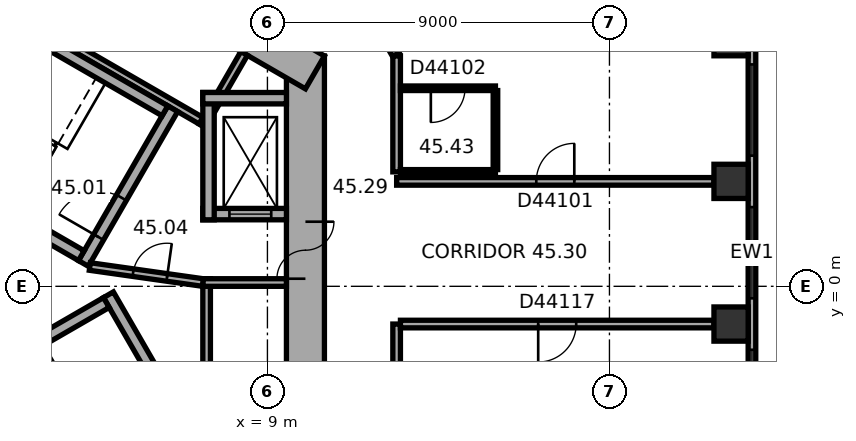
"""IFC4 building model, lengths in metres.
Left out: names, types, materials, properties, quantities, classifications, styles, units other than length and angle.
Written with IfcOpenShell. Run it as: python <this file> out.ifc"""

import sys

from ifc_helpers import new_model, si_unit, direction, frame, frame_2d, origin, origin_2d, place, context, subcontext, project, spatial, rectangle, extrude, element, fill, save


model = new_model("IFC4")
c1 = context("Model", 3, precision=1e-05, world=origin(), true_north=direction((0.0, 1.0)))
c2 = subcontext(c1, "Body", "Model", "MODEL_VIEW")
j1 = project(units=[si_unit("LENGTHUNIT", "METRE"), si_unit("PLANEANGLEUNIT", "RADIAN")], contexts=[c1])
p1 = place(None, origin())
s1 = spatial("IfcSite", under=j1, at=p1, CompositionType="ELEMENT")
p2 = place(p1, origin())
s2 = spatial("IfcBuilding", under=s1, at=p2, CompositionType="ELEMENT")
p3 = place(p2, frame((0.0, 0.0, 183.6)))
s3 = spatial("IfcBuildingStorey", under=s2, at=p3, CompositionType="ELEMENT", Elevation=183.6)
for number, where, z_axis, x_axis in (
    (1, (21.2, -0.993, 0.0), (0.0, 0.0, 1.0), (0.0, 1.0, 0.0)),
    (2, (21.2, 2.761, 0.0), (0.0, 0.0, 1.0), (0.0, 1.0, 0.0)),
    (3, (21.2, 6.515, 0.0), (0.0, 0.0, 1.0), (0.0, 1.0, 0.0)),
):
    element("IfcColumn", number, at=place(p3, frame(where, z_axis=z_axis, x_axis=x_axis)), inside=s3, PredefinedType="COLUMN", context=c2, shape_type="SweptSolid", body=[
        extrude(rectangle(XDim=0.9, YDim=0.9, at=origin_2d()), origin(), (0.0, 0.0, 1.0), 3.7),
    ])
p4 = place(p3, frame((10.0, -6.062, 0.0), z_axis=(0.0, 0.0, 1.0), x_axis=(0.0, 1.0, 0.0)))
e4 = element("IfcWall", 4, at=p4, inside=s3, PredefinedType="SHEAR", context=c2, shape_type="SweptSolid", body=[
    extrude(rectangle(XDim=12.125, YDim=1.0, at=frame_2d((6.062, 0.0))), origin(), (0.0, 0.0, 1.0), 3.7),
])
p5 = place(p4, frame((6.262, 0.0, 0.0)))
e5 = element("IfcOpeningElement", 5, at=p5, cuts=e4, PredefinedType="OPENING", context=c2, shape_type="SweptSolid", body=[
    extrude(rectangle(XDim=1.5, YDim=2.1, at=frame_2d((0.75, 1.05))), frame((0.0, 0.51, 0.0), z_axis=(0.0, -1.0, 0.0), x_axis=(1.0, 0.0, 0.0)), (0.0, 0.0, 1.0), 1.02),
])
p6 = place(p4, frame((3.112, 0.0, 0.0)))
e6 = element("IfcOpeningElement", 6, at=p6, cuts=e4, PredefinedType="OPENING", context=c2, shape_type="SweptSolid", body=[
    extrude(rectangle(XDim=0.9, YDim=2.1, at=frame_2d((0.45, 1.05))), frame((0.0, 0.51, 0.0), z_axis=(0.0, -1.0, 0.0), x_axis=(1.0, 0.0, 0.0)), (0.0, 0.0, 1.0), 1.02),
])
p7 = place(p3, frame((10.25, 5.629, 0.0), z_axis=(0.0, 0.0, 1.0), x_axis=(-0.866022616891, 0.50000482701, 0.0)))
e7 = element("IfcWall", 7, at=p7, inside=s3, PredefinedType="SHEAR", context=c2, shape_type="SweptSolid", body=[
    extrude(rectangle(XDim=12.125, YDim=1.0, at=frame_2d((6.062, 0.0))), origin(), (0.0, 0.0, 1.0), 3.7),
])
p8 = place(p7, frame((5.312, 0.0, 0.0)))
e8 = element("IfcOpeningElement", 8, at=p8, cuts=e7, PredefinedType="OPENING", context=c2, shape_type="SweptSolid", body=[
    extrude(rectangle(XDim=0.9, YDim=2.1, at=frame_2d((0.45, 1.05))), frame((0.0, 0.51, 0.0), z_axis=(0.0, -1.0, 0.0), x_axis=(1.0, 0.0, 0.0)), (0.0, 0.0, 1.0), 1.02),
])
p9 = place(p3, frame((21.75, -9.138, 0.0), z_axis=(0.0, 0.0, 1.0), x_axis=(0.0, 1.0, 0.0)))
e9 = element("IfcWall", 9, at=p9, inside=s3, PredefinedType="STANDARD", context=c2, shape_type="SweptSolid", body=[
    extrude(rectangle(XDim=20.044, YDim=0.2, at=frame_2d((10.022, 0.0))), origin(), (0.0, 0.0, 1.0), 3.7),
])
p10 = place(p9, frame((1.314, 0.0, 0.9)))
e10 = element("IfcOpeningElement", 10, at=p10, cuts=e9, PredefinedType="OPENING", context=c2, shape_type="SweptSolid", body=[
    extrude(rectangle(XDim=2.4, YDim=2.0, at=frame_2d((1.2, 1.0))), frame((0.0, 0.11, 0.0), z_axis=(0.0, -1.0, 0.0), x_axis=(1.0, 0.0, 0.0)), (0.0, 0.0, 1.0), 0.22),
])
p11 = place(p9, frame((5.069, 0.0, 0.9)))
e11 = element("IfcOpeningElement", 11, at=p11, cuts=e9, PredefinedType="OPENING", context=c2, shape_type="SweptSolid", body=[
    extrude(rectangle(XDim=2.4, YDim=2.0, at=frame_2d((1.2, 1.0))), frame((0.0, 0.11, 0.0), z_axis=(0.0, -1.0, 0.0), x_axis=(1.0, 0.0, 0.0)), (0.0, 0.0, 1.0), 0.22),
])
p12 = place(p9, frame((8.823, 0.0, 0.9)))
e12 = element("IfcOpeningElement", 12, at=p12, cuts=e9, PredefinedType="OPENING", context=c2, shape_type="SweptSolid", body=[
    extrude(rectangle(XDim=2.4, YDim=2.0, at=frame_2d((1.2, 1.0))), frame((0.0, 0.11, 0.0), z_axis=(0.0, -1.0, 0.0), x_axis=(1.0, 0.0, 0.0)), (0.0, 0.0, 1.0), 0.22),
])
p13 = place(p9, frame((12.577, 0.0, 0.9)))
e13 = element("IfcOpeningElement", 13, at=p13, cuts=e9, PredefinedType="OPENING", context=c2, shape_type="SweptSolid", body=[
    extrude(rectangle(XDim=2.4, YDim=2.0, at=frame_2d((1.2, 1.0))), frame((0.0, 0.11, 0.0), z_axis=(0.0, -1.0, 0.0), x_axis=(1.0, 0.0, 0.0)), (0.0, 0.0, 1.0), 0.22),
])
p14 = place(p9, frame((16.331, 0.0, 0.9)))
e14 = element("IfcOpeningElement", 14, at=p14, cuts=e9, PredefinedType="OPENING", context=c2, shape_type="SweptSolid", body=[
    extrude(rectangle(XDim=2.4, YDim=2.0, at=frame_2d((1.2, 1.0))), frame((0.0, 0.11, 0.0), z_axis=(0.0, -1.0, 0.0), x_axis=(1.0, 0.0, 0.0)), (0.0, 0.0, 1.0), 0.22),
])
p15 = place(p3, frame((7.4, -5.2, 0.0), z_axis=(0.0, 0.0, 1.0), x_axis=(0.0, 1.0, 0.0)))
e15 = element("IfcWall", 15, at=p15, inside=s3, PredefinedType="PARTITIONING", context=c2, shape_type="SweptSolid", body=[
    extrude(rectangle(XDim=5.4, YDim=0.2, at=frame_2d((2.7, 0.0))), origin(), (0.0, 0.0, 1.0), 3.42),
])
p16 = place(p3, frame((7.3, 0.1, 0.0), z_axis=(0.0, 0.0, 1.0), x_axis=(1.0, 0.0, 0.0)))
e16 = element("IfcWall", 16, at=p16, inside=s3, PredefinedType="PARTITIONING", context=c2, shape_type="SweptSolid", body=[
    extrude(rectangle(XDim=2.2, YDim=0.2, at=frame_2d((1.1, 0.0))), origin(), (0.0, 0.0, 1.0), 3.42),
])
p17 = place(p3, frame((7.424, 4.259, 0.0), z_axis=(0.0, 0.0, 1.0), x_axis=(-0.866026010844, 0.49999894854, 0.0)))
e17 = element("IfcWall", 17, at=p17, inside=s3, PredefinedType="PARTITIONING", context=c2, shape_type="SweptSolid", body=[
    extrude(rectangle(XDim=8.0, YDim=0.2, at=frame_2d((4.0, 0.0))), origin(), (0.0, 0.0, 1.0), 3.42),
])
p18 = place(p3, frame((7.287, 4.222, 0.0), z_axis=(0.0, 0.0, 1.0), x_axis=(0.499946605688, 0.86605622881, 0.0)))
e18 = element("IfcWall", 18, at=p18, inside=s3, PredefinedType="PARTITIONING", context=c2, shape_type="SweptSolid", body=[
    extrude(rectangle(XDim=2.2, YDim=0.2, at=frame_2d((1.1, 0.0))), origin(), (0.0, 0.0, 1.0), 3.42),
])
p19 = place(p3, frame((4.158, 0.602, 0.0), z_axis=(0.0, 0.0, 1.0), x_axis=(0.499977259774, 0.866038532462, 0.0)))
e19 = element("IfcWall", 19, at=p19, inside=s3, PredefinedType="SHEAR", context=c2, shape_type="SweptSolid", body=[
    extrude(rectangle(XDim=4.7, YDim=0.3, at=frame_2d((2.35, 0.0))), origin(), (0.0, 0.0, 1.0), 3.42),
])
p20 = place(p19, frame((0.8, 0.0, 0.0)))
e20 = element("IfcOpeningElement", 20, at=p20, cuts=e19, PredefinedType="OPENING", context=c2, shape_type="SweptSolid", body=[
    extrude(rectangle(XDim=1.2, YDim=2.1, at=frame_2d((0.6, 1.05))), frame((0.0, 0.16, 0.0), z_axis=(0.0, -1.0, 0.0), x_axis=(1.0, 0.0, 0.0)), (0.0, 0.0, 1.0), 0.32),
])
for number, where, z_axis, x_axis in (
    (21, (4.103, 0.807, 0.0), (0.0, 0.0, 1.0), (-0.866, 0.5, 0.0)),
    (22, (6.303, 4.617, 0.0), (0.0, 0.0, 1.0), (-0.866, 0.5, 0.0)),
):
    element("IfcWall", number, at=place(p3, frame(where, z_axis=z_axis, x_axis=x_axis)), inside=s3, PredefinedType="SHEAR", context=c2, shape_type="SweptSolid", body=[
        extrude(rectangle(XDim=7.06, YDim=0.3, at=frame_2d((3.53, 0.0))), origin(), (0.0, 0.0, 1.0), 3.42),
    ])
p21 = place(p3, frame((4.816, -0.222, 0.0), z_axis=(0.0, 0.0, 1.0), x_axis=(0.499977259774, -0.866038532462, 0.0)))
e23 = element("IfcWall", 23, at=p21, inside=s3, PredefinedType="SHEAR", context=c2, shape_type="SweptSolid", body=[
    extrude(rectangle(XDim=4.7, YDim=0.3, at=frame_2d((2.35, 0.0))), origin(), (0.0, 0.0, 1.0), 3.42),
])
p22 = place(p3, frame((-1.353, -3.957, 0.0), z_axis=(0.0, 0.0, 1.0), x_axis=(0.866027801685, 0.499995846692, 0.0)))
e24 = element("IfcWall", 24, at=p22, inside=s3, PredefinedType="SHEAR", context=c2, shape_type="SweptSolid", body=[
    extrude(rectangle(XDim=7.06, YDim=0.3, at=frame_2d((3.53, 0.0))), origin(), (0.0, 0.0, 1.0), 3.42),
])
p23 = place(p3, frame((7.3, 1.9, 0.0), z_axis=(0.0, 0.0, 1.0), x_axis=(1.0, 0.0, 0.0)))
e25 = element("IfcWall", 25, at=p23, inside=s3, PredefinedType="SHEAR", context=c2, shape_type="SweptSolid", body=[
    extrude(rectangle(XDim=2.2, YDim=0.3, at=frame_2d((1.1, 0.0))), origin(), (0.0, 0.0, 1.0), 3.42),
])
p24 = place(p23, frame((0.7, 0.0, 0.0)))
e26 = element("IfcOpeningElement", 26, at=p24, cuts=e25, PredefinedType="OPENING", context=c2, shape_type="SweptSolid", body=[
    extrude(rectangle(XDim=1.1, YDim=2.1, at=frame_2d((0.55, 1.05))), frame((0.0, 0.16, 0.0), z_axis=(0.0, -1.0, 0.0), x_axis=(1.0, 0.0, 0.0)), (0.0, 0.0, 1.0), 0.32),
])
p25 = place(p3, frame((7.45, 1.75, 0.0), z_axis=(0.0, 0.0, 1.0), x_axis=(0.0, 1.0, 0.0)))
e27 = element("IfcWall", 27, at=p25, inside=s3, PredefinedType="SHEAR", context=c2, shape_type="SweptSolid", body=[
    extrude(rectangle(XDim=3.35, YDim=0.3, at=frame_2d((1.675, 0.0))), origin(), (0.0, 0.0, 1.0), 3.42),
])
p26 = place(p3, frame((7.3, 4.95, 0.0), z_axis=(0.0, 0.0, 1.0), x_axis=(1.0, 0.0, 0.0)))
e28 = element("IfcWall", 28, at=p26, inside=s3, PredefinedType="SHEAR", context=c2, shape_type="SweptSolid", body=[
    extrude(rectangle(XDim=2.2, YDim=0.3, at=frame_2d((1.1, 0.0))), origin(), (0.0, 0.0, 1.0), 3.42),
])
p27 = place(p3, frame((4.327, 0.521, 0.0), z_axis=(0.0, 0.0, 1.0), x_axis=(0.990124376366, -0.14019172346, 0.0)))
e29 = element("IfcWall", 29, at=p27, inside=s3, PredefinedType="PARTITIONING", context=c2, shape_type="SweptSolid", body=[
    extrude(rectangle(XDim=3.002, YDim=0.2, at=frame_2d((1.501, 0.0))), origin(), (0.0, 0.0, 1.0), 3.42),
])
p28 = place(p27, frame((1.15, 0.0, 0.0)))
e30 = element("IfcOpeningElement", 30, at=p28, cuts=e29, PredefinedType="OPENING", context=c2, shape_type="SweptSolid", body=[
    extrude(rectangle(XDim=0.9, YDim=2.1, at=frame_2d((0.45, 1.05))), frame((0.0, 0.11, 0.0), z_axis=(0.0, -1.0, 0.0), x_axis=(1.0, 0.0, 0.0)), (0.0, 0.0, 1.0), 0.22),
])
p29 = place(p3, frame((12.38, 6.097, 0.0), z_axis=(0.0, 0.0, 1.0), x_axis=(-0.499964847546, 0.866045698112, 0.0)))
e31 = element("IfcWall", 31, at=p29, inside=s3, PredefinedType="PARTITIONING", context=c2, shape_type="SweptSolid", body=[
    extrude(rectangle(XDim=1.86, YDim=0.2, at=frame_2d((0.93, 0.0))), origin(), (0.0, 0.0, 1.0), 3.42),
])
p30 = place(p3, frame((12.4, -6.022, 0.0), z_axis=(0.0, 0.0, 1.0), x_axis=(0.0, 1.0, 0.0)))
e32 = element("IfcWall", 32, at=p30, inside=s3, PredefinedType="PARTITIONING", context=c2, shape_type="SweptSolid", body=[
    extrude(rectangle(XDim=5.029, YDim=0.2, at=frame_2d((2.515, 0.0))), origin(), (0.0, 0.0, 1.0), 3.42),
])
p31 = place(p3, frame((12.4, 3.011, 0.0), z_axis=(0.0, 0.0, 1.0), x_axis=(0.0, 1.0, 0.0)))
e33 = element("IfcWall", 33, at=p31, inside=s3, PredefinedType="PARTITIONING", context=c2, shape_type="SweptSolid", body=[
    extrude(rectangle(XDim=3.051, YDim=0.2, at=frame_2d((1.525, 0.0))), origin(), (0.0, 0.0, 1.0), 3.42),
])
p32 = place(p3, frame((12.5, -0.993, 0.0), z_axis=(0.0, 0.0, 1.0), x_axis=(1.0, 0.0, 0.0)))
e34 = element("IfcWall", 34, at=p32, inside=s3, PredefinedType="PARTITIONING", context=c2, shape_type="SweptSolid", body=[
    extrude(rectangle(XDim=8.25, YDim=0.2, at=frame_2d((4.125, 0.0))), origin(), (0.0, 0.0, 1.0), 2.87),
])
p33 = place(p32, frame((3.625, 0.0, 0.0)))
e35 = element("IfcOpeningElement", 35, at=p33, cuts=e34, PredefinedType="OPENING", context=c2, shape_type="SweptSolid", body=[
    extrude(rectangle(XDim=1.0, YDim=2.1, at=frame_2d((0.5, 1.05))), frame((0.0, 0.11, 0.0), z_axis=(0.0, -1.0, 0.0), x_axis=(1.0, 0.0, 0.0)), (0.0, 0.0, 1.0), 0.22),
])
p34 = place(p3, frame((12.5, 5.211, 0.0), z_axis=(0.0, 0.0, 1.0), x_axis=(1.0, 0.0, 0.0)))
e36 = element("IfcWall", 36, at=p34, inside=s3, PredefinedType="PARTITIONING", context=c2, shape_type="SweptSolid", body=[
    extrude(rectangle(XDim=2.5, YDim=0.12, at=frame_2d((1.25, 0.0))), origin(), (0.0, 0.0, 1.0), 3.42),
])
p35 = place(p34, frame((0.8, 0.0, 0.0)))
e37 = element("IfcOpeningElement", 37, at=p35, cuts=e36, PredefinedType="OPENING", context=c2, shape_type="SweptSolid", body=[
    extrude(rectangle(XDim=0.9, YDim=2.1, at=frame_2d((0.45, 1.05))), frame((0.0, 0.07, 0.0), z_axis=(0.0, -1.0, 0.0), x_axis=(1.0, 0.0, 0.0)), (0.0, 0.0, 1.0), 0.14),
])
p36 = place(p3, frame((15.0, 3.011, 0.0), z_axis=(0.0, 0.0, 1.0), x_axis=(-1.0, 0.0, 0.0)))
e38 = element("IfcWall", 38, at=p36, inside=s3, PredefinedType="PARTITIONING", context=c2, shape_type="SweptSolid", body=[
    extrude(rectangle(XDim=2.5, YDim=0.12, at=frame_2d((1.25, 0.0))), origin(), (0.0, 0.0, 1.0), 3.42),
])
p37 = place(p3, frame((15.0, 5.151, 0.0), z_axis=(0.0, 0.0, 1.0), x_axis=(0.0, -1.0, 0.0)))
e39 = element("IfcWall", 39, at=p37, inside=s3, PredefinedType="PARTITIONING", context=c2, shape_type="SweptSolid", body=[
    extrude(rectangle(XDim=2.08, YDim=0.12, at=frame_2d((1.04, 0.0))), origin(), (0.0, 0.0, 1.0), 3.42),
])
p38 = place(p3, frame((20.75, 2.761, 0.0), z_axis=(0.0, 0.0, 1.0), x_axis=(-1.0, 0.0, 0.0)))
e40 = element("IfcWall", 40, at=p38, inside=s3, PredefinedType="PARTITIONING", context=c2, shape_type="SweptSolid", body=[
    extrude(rectangle(XDim=8.35, YDim=0.2, at=frame_2d((4.175, 0.0))), origin(), (0.0, 0.0, 1.0), 3.42),
])
p39 = place(p38, frame((3.675, 0.0, 0.0)))
e41 = element("IfcOpeningElement", 41, at=p39, cuts=e40, PredefinedType="OPENING", context=c2, shape_type="SweptSolid", body=[
    extrude(rectangle(XDim=1.0, YDim=2.1, at=frame_2d((0.5, 1.05))), frame((0.0, 0.11, 0.0), z_axis=(0.0, -1.0, 0.0), x_axis=(1.0, 0.0, 0.0)), (0.0, 0.0, 1.0), 0.22),
])
p40 = place(p11, origin())
e42 = element("IfcWindow", 42, at=p40, inside=s3, PartitioningType="SINGLE_PANEL", PredefinedType="WINDOW", context=c2, shape_type="SweptSolid", body=[
    extrude(rectangle(XDim=2.4, YDim=2.0, at=frame_2d((1.2, 1.0))), frame((0.0, 0.03, 0.0), z_axis=(0.0, -1.0, 0.0), x_axis=(1.0, 0.0, 0.0)), (0.0, 0.0, 1.0), 0.06),
])
fill(e11, e42)
p41 = place(p12, origin())
e43 = element("IfcWindow", 43, at=p41, inside=s3, PartitioningType="SINGLE_PANEL", PredefinedType="WINDOW", context=c2, shape_type="SweptSolid", body=[
    extrude(rectangle(XDim=2.4, YDim=2.0, at=frame_2d((1.2, 1.0))), frame((0.0, 0.03, 0.0), z_axis=(0.0, -1.0, 0.0), x_axis=(1.0, 0.0, 0.0)), (0.0, 0.0, 1.0), 0.06),
])
fill(e12, e43)
p42 = place(p13, origin())
e44 = element("IfcWindow", 44, at=p42, inside=s3, PartitioningType="SINGLE_PANEL", PredefinedType="WINDOW", context=c2, shape_type="SweptSolid", body=[
    extrude(rectangle(XDim=2.4, YDim=2.0, at=frame_2d((1.2, 1.0))), frame((0.0, 0.03, 0.0), z_axis=(0.0, -1.0, 0.0), x_axis=(1.0, 0.0, 0.0)), (0.0, 0.0, 1.0), 0.06),
])
fill(e13, e44)
p43 = place(p5, origin())
e45 = element("IfcDoor", 45, at=p43, inside=s3, OperationType="DOUBLE_DOOR_SINGLE_SWING", PredefinedType="DOOR", context=c2, shape_type="SweptSolid", body=[
    extrude(rectangle(XDim=1.5, YDim=2.1, at=frame_2d((0.75, 1.05))), frame((0.0, 0.025, 0.0), z_axis=(0.0, -1.0, 0.0), x_axis=(1.0, 0.0, 0.0)), (0.0, 0.0, 1.0), 0.05),
])
fill(e5, e45)
p44 = place(p20, origin())
e46 = element("IfcDoor", 46, at=p44, inside=s3, OperationType="SINGLE_SWING_RIGHT", PredefinedType="DOOR", context=c2, shape_type="SweptSolid", body=[
    extrude(rectangle(XDim=1.2, YDim=2.1, at=frame_2d((0.6, 1.05))), frame((0.0, 0.025, 0.0), z_axis=(0.0, -1.0, 0.0), x_axis=(1.0, 0.0, 0.0)), (0.0, 0.0, 1.0), 0.05),
])
fill(e20, e46)
p45 = place(p28, origin())
e47 = element("IfcDoor", 47, at=p45, inside=s3, OperationType="SINGLE_SWING_LEFT", PredefinedType="DOOR", context=c2, shape_type="SweptSolid", body=[
    extrude(rectangle(XDim=0.9, YDim=2.1, at=frame_2d((0.45, 1.05))), frame((0.0, 0.025, 0.0), z_axis=(0.0, -1.0, 0.0), x_axis=(1.0, 0.0, 0.0)), (0.0, 0.0, 1.0), 0.05),
])
fill(e30, e47)
p46 = place(p24, origin())
e48 = element("IfcDoor", 48, at=p46, inside=s3, OperationType="DOUBLE_DOOR_SLIDING", PredefinedType="DOOR", context=c2, shape_type="SweptSolid", body=[
    extrude(rectangle(XDim=1.1, YDim=2.1, at=frame_2d((0.55, 1.05))), frame((0.0, 0.025, 0.0), z_axis=(0.0, -1.0, 0.0), x_axis=(1.0, 0.0, 0.0)), (0.0, 0.0, 1.0), 0.05),
])
fill(e26, e48)
p47 = place(p39, origin())
e49 = element("IfcDoor", 49, at=p47, inside=s3, OperationType="SINGLE_SWING_LEFT", PredefinedType="DOOR", context=c2, shape_type="SweptSolid", body=[
    extrude(rectangle(XDim=1.0, YDim=2.1, at=frame_2d((0.5, 1.05))), frame((0.0, 0.025, 0.0), z_axis=(0.0, -1.0, 0.0), x_axis=(1.0, 0.0, 0.0)), (0.0, 0.0, 1.0), 0.05),
])
fill(e41, e49)
p48 = place(p35, origin())
e50 = element("IfcDoor", 50, at=p48, inside=s3, OperationType="SINGLE_SWING_LEFT", PredefinedType="DOOR", context=c2, shape_type="SweptSolid", body=[
    extrude(rectangle(XDim=0.9, YDim=2.1, at=frame_2d((0.45, 1.05))), frame((0.0, 0.025, 0.0), z_axis=(0.0, -1.0, 0.0), x_axis=(1.0, 0.0, 0.0)), (0.0, 0.0, 1.0), 0.05),
])
fill(e37, e50)
p49 = place(p33, origin())
e51 = element("IfcDoor", 51, at=p49, inside=s3, OperationType="SINGLE_SWING_LEFT", PredefinedType="DOOR", context=c2, shape_type="SweptSolid", body=[
    extrude(rectangle(XDim=1.0, YDim=2.1, at=frame_2d((0.5, 1.05))), frame((0.0, 0.025, 0.0), z_axis=(0.0, -1.0, 0.0), x_axis=(1.0, 0.0, 0.0)), (0.0, 0.0, 1.0), 0.05),
])
fill(e35, e51)
save(model, sys.argv[1])
